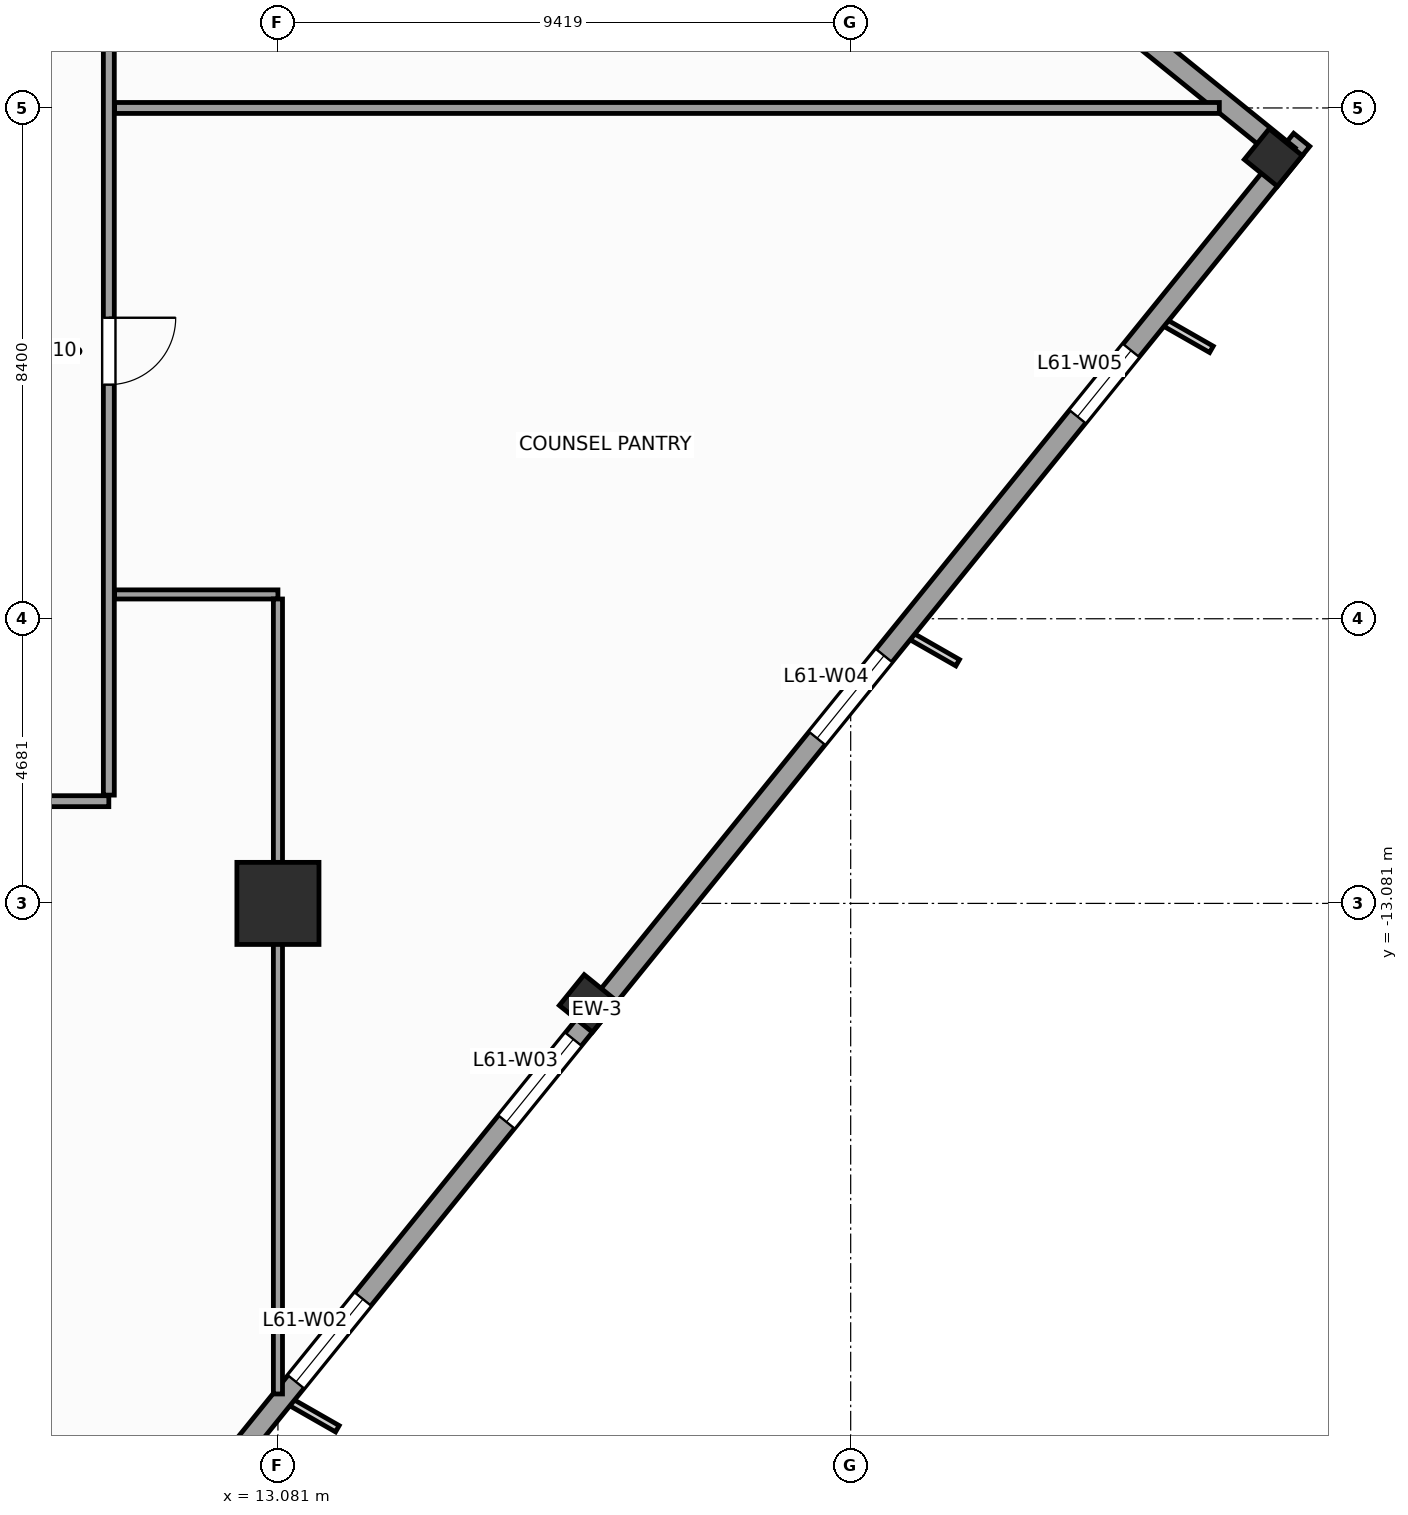
"""IFC4 building model, lengths in metres.
Left out: names, types, materials, properties, quantities, classifications, styles, units other than length and angle.
Written with IfcOpenShell. Run it as: python <this file> out.ifc"""

import sys

from ifc_helpers import new_model, si_unit, direction, frame, frame_2d, origin, origin_2d, place, context, subcontext, project, spatial, rectangle, extrude, source, transform, mapped, element, fill, save


model = new_model("IFC4")
c1 = context("Model", 3, precision=1e-05, world=origin(), true_north=direction((0.0, 1.0)))
c2 = subcontext(c1, "Body", "Model", "MODEL_VIEW")
j1 = project(units=[si_unit("LENGTHUNIT", "METRE"), si_unit("PLANEANGLEUNIT", "RADIAN")], contexts=[c1])
p1 = place(None, origin())
s1 = spatial("IfcSite", under=j1, at=p1, CompositionType="ELEMENT")
p2 = place(p1, origin())
s2 = spatial("IfcBuilding", under=s1, at=p2, CompositionType="ELEMENT")
p3 = place(p2, frame((0.0, 0.0, 252.4)))
s3 = spatial("IfcBuildingStorey", under=s2, at=p3, CompositionType="ELEMENT", Elevation=252.4)
m1 = source(origin(), c2, "Body", "SweptSolid", [
    extrude(rectangle(XDim=1.35, YDim=1.35, at=origin_2d()), origin(), (0.0, 0.0, 1.0), 3.9),
])
p4 = place(p3, frame((13.081, -13.081, 0.0), z_axis=(0.0, 0.0, 1.0), x_axis=(1.0, 0.0, 0.0)))
e1 = element("IfcColumn", 1, at=p4, inside=s3, PredefinedType="COLUMN", context=c2, shape_type="MappedRepresentation", body=[
    mapped(m1, transform((0.0, 0.0, 0.0), scale=1.0)),
])
m2 = source(origin(), c2, "Body", "SweptSolid", [
    extrude(rectangle(XDim=0.65, YDim=0.7, at=origin_2d()), origin(), (0.0, 0.0, 1.0), 3.9),
])
for number, where, z_axis, x_axis in (
    (2, (18.185, -14.726, 0.0), (0.0, 0.0, 1.0), (0.629, 0.777, 0.0)),
    (3, (29.45, -0.815, 0.0), (0.0, 0.0, 1.0), (0.629, 0.777, 0.0)),
):
    element("IfcColumn", number, at=place(p3, frame(where, z_axis=z_axis, x_axis=x_axis)), inside=s3, PredefinedType="COLUMN", context=c2, shape_type="MappedRepresentation", body=[
        mapped(m2, transform((0.0, 0.0, 0.0), scale=1.0)),
    ])
p5 = place(p3, frame((6.733, -29.154, 0.0), z_axis=(0.0, 0.0, 1.0), x_axis=(0.629325378072, 0.77714192302, 0.0)))
e4 = element("IfcWall", 4, at=p5, inside=s3, PredefinedType="STANDARD", context=c2, shape_type="SweptSolid", body=[
    extrude(rectangle(XDim=36.84, YDim=0.34, at=frame_2d((18.42, 0.0))), origin(), (0.0, 0.0, 1.0), 2.96),
])
p6 = place(p5, frame((3.721, 0.0, 0.48)))
e5 = element("IfcOpeningElement", 5, at=p6, cuts=e4, PredefinedType="OPENING", context=c2, shape_type="SweptSolid", body=[
    extrude(rectangle(XDim=1.4, YDim=2.4, at=frame_2d((0.7, 1.2))), frame((0.0, 0.18, 0.0), z_axis=(0.0, -1.0, 0.0), x_axis=(1.0, 0.0, 0.0)), (0.0, 0.0, 1.0), 0.36),
])
p7 = place(p5, frame((10.559, 0.0, 0.58)))
e6 = element("IfcOpeningElement", 6, at=p7, cuts=e4, PredefinedType="OPENING", context=c2, shape_type="SweptSolid", body=[
    extrude(rectangle(XDim=1.75, YDim=2.3, at=frame_2d((0.875, 1.15))), frame((0.0, 0.18, 0.0), z_axis=(0.0, -1.0, 0.0), x_axis=(1.0, 0.0, 0.0)), (0.0, 0.0, 1.0), 0.36),
])
p8 = place(p5, frame((16.058, 0.0, 0.58)))
e7 = element("IfcOpeningElement", 7, at=p8, cuts=e4, PredefinedType="OPENING", context=c2, shape_type="SweptSolid", body=[
    extrude(rectangle(XDim=1.75, YDim=2.3, at=frame_2d((0.875, 1.15))), frame((0.0, 0.18, 0.0), z_axis=(0.0, -1.0, 0.0), x_axis=(1.0, 0.0, 0.0)), (0.0, 0.0, 1.0), 0.36),
])
p9 = place(p5, frame((24.176, 0.0, 0.58)))
e8 = element("IfcOpeningElement", 8, at=p9, cuts=e4, PredefinedType="OPENING", context=c2, shape_type="SweptSolid", body=[
    extrude(rectangle(XDim=1.75, YDim=2.3, at=frame_2d((0.875, 1.15))), frame((0.0, 0.18, 0.0), z_axis=(0.0, -1.0, 0.0), x_axis=(1.0, 0.0, 0.0)), (0.0, 0.0, 1.0), 0.36),
])
p10 = place(p5, frame((30.982, 0.0, 0.48)))
e9 = element("IfcOpeningElement", 9, at=p10, cuts=e4, PredefinedType="OPENING", context=c2, shape_type="SweptSolid", body=[
    extrude(rectangle(XDim=1.4, YDim=2.4, at=frame_2d((0.7, 1.2))), frame((0.0, 0.18, 0.0), z_axis=(0.0, -1.0, 0.0), x_axis=(1.0, 0.0, 0.0)), (0.0, 0.0, 1.0), 0.36),
])
p11 = place(p3, frame((29.703, -0.789, 0.0), z_axis=(0.0, 0.0, 1.0), x_axis=(-0.77714355312, 0.629323365087, 0.0)))
e10 = element("IfcWall", 10, at=p11, inside=s3, PredefinedType="STANDARD", context=c2, shape_type="SweptSolid", body=[
    extrude(rectangle(XDim=5.5, YDim=0.34, at=frame_2d((2.75, 0.0))), origin(), (0.0, 0.0, 1.0), 3.66),
])
p12 = place(p3, frame((-11.35, -11.4, 0.0), z_axis=(0.0, 0.0, 1.0), x_axis=(1.0, 0.0, 0.0)))
e11 = element("IfcWall", 11, at=p12, inside=s3, PredefinedType="PARTITIONING", context=c2, shape_type="SweptSolid", body=[
    extrude(rectangle(XDim=21.65, YDim=0.18, at=frame_2d((10.825, 0.0))), origin(), (0.0, 0.0, 1.0), 3.66),
])
p13 = place(p12, frame((1.455, 0.0, 0.0)))
e12 = element("IfcOpeningElement", 12, at=p13, cuts=e11, PredefinedType="OPENING", context=c2, shape_type="SweptSolid", body=[
    extrude(rectangle(XDim=0.95, YDim=2.1, at=frame_2d((0.475, 1.05))), frame((0.0, 0.1, 0.0), z_axis=(0.0, -1.0, 0.0), x_axis=(1.0, 0.0, 0.0)), (0.0, 0.0, 1.0), 0.2),
])
p14 = place(p12, frame((12.311, 0.0, 0.0)))
e13 = element("IfcOpeningElement", 13, at=p14, cuts=e11, PredefinedType="OPENING", context=c2, shape_type="SweptSolid", body=[
    extrude(rectangle(XDim=0.95, YDim=2.1, at=frame_2d((0.475, 1.05))), frame((0.0, 0.1, 0.0), z_axis=(0.0, -1.0, 0.0), x_axis=(1.0, 0.0, 0.0)), (0.0, 0.0, 1.0), 0.2),
])
p15 = place(p12, frame((17.06, 0.0, 0.0)))
e14 = element("IfcOpeningElement", 14, at=p15, cuts=e11, PredefinedType="OPENING", context=c2, shape_type="SweptSolid", body=[
    extrude(rectangle(XDim=1.1, YDim=2.2, at=frame_2d((0.55, 1.1))), frame((0.0, 0.1, 0.0), z_axis=(0.0, -1.0, 0.0), x_axis=(1.0, 0.0, 0.0)), (0.0, 0.0, 1.0), 0.2),
])
p16 = place(p12, frame((6.584, 0.0, 0.0)))
e15 = element("IfcOpeningElement", 15, at=p16, cuts=e11, PredefinedType="OPENING", context=c2, shape_type="SweptSolid", body=[
    extrude(rectangle(XDim=1.1, YDim=2.2, at=frame_2d((0.55, 1.1))), frame((0.0, 0.1, 0.0), z_axis=(0.0, -1.0, 0.0), x_axis=(1.0, 0.0, 0.0)), (0.0, 0.0, 1.0), 0.2),
])
p17 = place(p3, frame((10.3, -11.3, 0.0), z_axis=(0.0, 0.0, 1.0), x_axis=(0.0, 1.0, 0.0)))
e16 = element("IfcWall", 16, at=p17, inside=s3, PredefinedType="PARTITIONING", context=c2, shape_type="SweptSolid", body=[
    extrude(rectangle(XDim=23.65, YDim=0.18, at=frame_2d((11.825, 0.0))), origin(), (0.0, 0.0, 1.0), 3.66),
])
p18 = place(p17, frame((14.75, 0.0, 0.0)))
e17 = element("IfcOpeningElement", 17, at=p18, cuts=e16, PredefinedType="OPENING", context=c2, shape_type="SweptSolid", body=[
    extrude(rectangle(XDim=1.1, YDim=2.2, at=frame_2d((0.55, 1.1))), frame((0.0, 0.1, 0.0), z_axis=(0.0, -1.0, 0.0), x_axis=(1.0, 0.0, 0.0)), (0.0, 0.0, 1.0), 0.2),
])
p19 = place(p17, frame((6.75, 0.0, 0.0)))
e18 = element("IfcOpeningElement", 18, at=p19, cuts=e16, PredefinedType="OPENING", context=c2, shape_type="SweptSolid", body=[
    extrude(rectangle(XDim=1.1, YDim=2.2, at=frame_2d((0.55, 1.1))), frame((0.0, 0.1, 0.0), z_axis=(0.0, -1.0, 0.0), x_axis=(1.0, 0.0, 0.0)), (0.0, 0.0, 1.0), 0.2),
])
p20 = place(p3, frame((10.395, 0.0, 0.0), z_axis=(0.0, 0.0, 1.0), x_axis=(1.0, 0.0, 0.0)))
e19 = element("IfcWall", 19, at=p20, inside=s3, PredefinedType="PARTITIONING", context=c2, shape_type="SweptSolid", body=[
    extrude(rectangle(XDim=18.167, YDim=0.18, at=frame_2d((9.084, 0.0))), origin(), (0.0, 0.0, 1.0), 3.66),
])
p21 = place(p3, frame((10.395, -8.0, 0.0), z_axis=(0.0, 0.0, 1.0), x_axis=(1.0, 0.0, 0.0)))
e20 = element("IfcWall", 20, at=p21, inside=s3, PredefinedType="PARTITIONING", context=c2, shape_type="SweptSolid", body=[
    extrude(rectangle(XDim=2.686, YDim=0.15, at=frame_2d((1.343, 0.0))), origin(), (0.0, 0.0, 1.0), 3.66),
])
p22 = place(p3, frame((13.081, -8.075, 0.0), z_axis=(0.0, 0.0, 1.0), x_axis=(0.0, -1.0, 0.0)))
e21 = element("IfcWall", 21, at=p22, inside=s3, PredefinedType="PARTITIONING", context=c2, shape_type="SweptSolid", body=[
    extrude(rectangle(XDim=13.073, YDim=0.15, at=frame_2d((6.537, 0.0))), origin(), (0.0, 0.0, 1.0), 2.76),
])
m3 = source(origin(), c2, "Body", "SweptSolid", [
    extrude(rectangle(XDim=1.75, YDim=2.3, at=frame_2d((0.875, 1.15))), frame((0.0, 0.03, 0.0), z_axis=(0.0, -1.0, 0.0), x_axis=(1.0, 0.0, 0.0)), (0.0, 0.0, 1.0), 0.06),
])
p23 = place(p7, origin())
e22 = element("IfcWindow", 22, at=p23, inside=s3, PartitioningType="SINGLE_PANEL", PredefinedType="WINDOW", context=c2, shape_type="MappedRepresentation", body=[
    mapped(m3, transform((0.0, 0.0, 0.0), scale=1.0)),
])
fill(e6, e22)
p24 = place(p8, origin())
e23 = element("IfcWindow", 23, at=p24, inside=s3, PartitioningType="SINGLE_PANEL", PredefinedType="WINDOW", context=c2, shape_type="MappedRepresentation", body=[
    mapped(m3, transform((0.0, 0.0, 0.0), scale=1.0)),
])
fill(e7, e23)
p25 = place(p9, origin())
e24 = element("IfcWindow", 24, at=p25, inside=s3, PartitioningType="SINGLE_PANEL", PredefinedType="WINDOW", context=c2, shape_type="MappedRepresentation", body=[
    mapped(m3, transform((0.0, 0.0, 0.0), scale=1.0)),
])
fill(e8, e24)
m4 = source(origin(), c2, "Body", "SweptSolid", [
    extrude(rectangle(XDim=1.4, YDim=2.4, at=frame_2d((0.7, 1.2))), frame((0.0, 0.03, 0.0), z_axis=(0.0, -1.0, 0.0), x_axis=(1.0, 0.0, 0.0)), (0.0, 0.0, 1.0), 0.06),
])
p26 = place(p10, origin())
e25 = element("IfcWindow", 25, at=p26, inside=s3, PartitioningType="SINGLE_PANEL", PredefinedType="WINDOW", context=c2, shape_type="MappedRepresentation", body=[
    mapped(m4, transform((0.0, 0.0, 0.0), scale=1.0)),
])
fill(e9, e25)
m5 = source(origin(), c2, "Body", "SweptSolid", [
    extrude(rectangle(XDim=1.1, YDim=2.2, at=frame_2d((0.55, 1.1))), frame((0.0, 0.025, 0.0), z_axis=(0.0, -1.0, 0.0), x_axis=(1.0, 0.0, 0.0)), (0.0, 0.0, 1.0), 0.05),
])
p27 = place(p19, frame((1.1, 0.0, 0.0), z_axis=(0.0, 0.0, 1.0), x_axis=(-1.0, 0.0, 0.0)))
e26 = element("IfcDoor", 26, at=p27, inside=s3, OperationType="SINGLE_SWING_RIGHT", PredefinedType="DOOR", context=c2, shape_type="MappedRepresentation", body=[
    mapped(m5, transform((0.0, 0.0, 0.0), scale=1.0)),
])
fill(e18, e26)
save(model, sys.argv[1])
